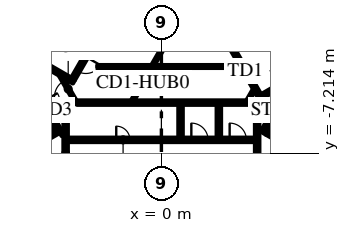
"""IFC4 building model, lengths in metres.
Left out: names, types, materials, properties, quantities, classifications, styles, units other than length and angle.
Written with IfcOpenShell. Run it as: python <this file> out.ifc"""

import sys

from ifc_helpers import new_model, si_unit, direction, frame, frame_2d, origin, place, context, subcontext, project, spatial, polyline, rectangle, outline, extrude, element, fill, save


model = new_model("IFC4")
c1 = context("Model", 3, precision=1e-05, world=origin(), true_north=direction((0.0, 1.0)))
c2 = subcontext(c1, "Body", "Model", "MODEL_VIEW")
j1 = project(units=[si_unit("LENGTHUNIT", "METRE"), si_unit("PLANEANGLEUNIT", "RADIAN")], contexts=[c1])
p1 = place(None, origin())
s1 = spatial("IfcSite", under=j1, at=p1, CompositionType="ELEMENT")
p2 = place(p1, origin())
s2 = spatial("IfcBuilding", under=s1, at=p2, CompositionType="ELEMENT")
p3 = place(p2, frame((0.0, 0.0, 21.6)))
s3 = spatial("IfcBuildingStorey", under=s2, at=p3, CompositionType="ELEMENT", Elevation=21.6)
p4 = place(p3, frame((6.776, 13.364, 0.0), z_axis=(0.0, 0.0, 1.0), x_axis=(0.500004177138, -0.8660229921, 0.0)))
e1 = element("IfcWall", 1, at=p4, inside=s3, PredefinedType="SOLIDWALL", context=c2, shape_type="SweptSolid", body=[
    extrude(rectangle(XDim=20.204, YDim=0.9, at=frame_2d((10.102, 0.0))), origin(), (0.0, 0.0, 1.0), 6.0),
])
p5 = place(p3, frame((-15.36, -1.503, 0.0), z_axis=(0.0, 0.0, 1.0), x_axis=(0.50000389221, 0.866023156604, 0.0)))
e2 = element("IfcWall", 2, at=p5, inside=s3, PredefinedType="SOLIDWALL", context=c2, shape_type="SweptSolid", body=[
    extrude(rectangle(XDim=21.0, YDim=0.9, at=frame_2d((10.5, 0.0))), origin(), (0.0, 0.0, 1.0), 6.0),
])
p6 = place(p3, frame((12.84, -9.261, 0.0), z_axis=(0.0, 0.0, 1.0), x_axis=(-0.866013990052, 0.500019768644, 0.0)))
e3 = element("IfcWall", 3, at=p6, inside=s3, PredefinedType="SOLIDWALL", context=c2, shape_type="SweptSolid", body=[
    extrude(rectangle(XDim=6.8, YDim=0.25, at=frame_2d((3.4, 0.0))), origin(), (0.0, 0.0, 1.0), 6.0),
])
p7 = place(p3, frame((6.78, -5.906, 0.0), z_axis=(0.0, 0.0, 1.0), x_axis=(0.500223362819, 0.865896406789, 0.0)))
e4 = element("IfcWall", 4, at=p7, inside=s3, PredefinedType="SOLIDWALL", context=c2, shape_type="SweptSolid", body=[
    extrude(rectangle(XDim=0.675, YDim=0.25, at=frame_2d((0.337, 0.0))), origin(), (0.0, 0.0, 1.0), 6.0),
])
p8 = place(p3, frame((-12.84, -9.261, 0.0), z_axis=(0.0, 0.0, 1.0), x_axis=(0.866016039709, 0.500016218704, 0.0)))
e5 = element("IfcWall", 5, at=p8, inside=s3, PredefinedType="SOLIDWALL", context=c2, shape_type="SweptSolid", body=[
    extrude(rectangle(XDim=7.05, YDim=0.25, at=frame_2d((3.525, 0.0))), origin(), (0.0, 0.0, 1.0), 6.0),
])
p9 = place(p3, frame((-6.905, -5.69, 0.0), z_axis=(0.0, 0.0, 1.0), x_axis=(-0.500402024738, 0.865793170242, 0.0)))
e6 = element("IfcWall", 6, at=p9, inside=s3, PredefinedType="SOLIDWALL", context=c2, shape_type="SweptSolid", body=[
    extrude(rectangle(XDim=0.425, YDim=0.25, at=frame_2d((0.212, 0.0))), origin(), (0.0, 0.0, 1.0), 6.0),
])
p10 = place(p3, frame((-5.545, -3.875, 0.0), z_axis=(0.0, 0.0, 1.0), x_axis=(1.0, 0.0, 0.0)))
e7 = element("IfcWall", 7, at=p10, inside=s3, PredefinedType="SOLIDWALL", context=c2, shape_type="SweptSolid", body=[
    extrude(rectangle(XDim=11.97, YDim=0.25, at=frame_2d((5.985, 0.0))), origin(), (0.0, 0.0, 1.0), 6.0),
])
p11 = place(p3, frame((-6.425, -3.875, 0.0), z_axis=(0.0, 0.0, 1.0), x_axis=(1.0, 0.0, 0.0)))
e8 = element("IfcWall", 8, at=p11, inside=s3, PredefinedType="SOLIDWALL", context=c2, shape_type="SweptSolid", body=[
    extrude(rectangle(XDim=0.658, YDim=0.25, at=frame_2d((0.329, 0.0))), origin(), (0.0, 0.0, 1.0), 6.0),
])
p12 = place(p3, frame((6.3, -7.268, 0.0), z_axis=(0.0, 0.0, 1.0), x_axis=(0.0, 1.0, 0.0)))
e9 = element("IfcWall", 9, at=p12, inside=s3, PredefinedType="SOLIDWALL", context=c2, shape_type="SweptSolid", body=[
    extrude(rectangle(XDim=3.268, YDim=0.25, at=frame_2d((1.634, 0.0))), origin(), (0.0, 0.0, 1.0), 6.0),
])
for number, where, z_axis, x_axis in (
    (10, (3.78, -4.0, 0.0), (0.0, 0.0, 1.0), (0.0, -1.0, 0.0)),
    (11, (1.26, -4.0, 0.0), (0.0, 0.0, 1.0), (0.0, -1.0, 0.0)),
):
    element("IfcWall", number, at=place(p3, frame(where, z_axis=z_axis, x_axis=x_axis)), inside=s3, PredefinedType="SOLIDWALL", context=c2, shape_type="SweptSolid", body=[
        extrude(rectangle(XDim=2.2, YDim=0.25, at=frame_2d((1.1, 0.0))), origin(), (0.0, 0.0, 1.0), 6.0),
    ])
p13 = place(p3, frame((-6.3, -4.0, 0.0), z_axis=(0.0, 0.0, 1.0), x_axis=(0.0, -1.0, 0.0)))
e12 = element("IfcWall", 12, at=p13, inside=s3, PredefinedType="SOLIDWALL", context=c2, shape_type="SweptSolid", body=[
    extrude(rectangle(XDim=3.154, YDim=0.25, at=frame_2d((1.577, 0.0))), origin(), (0.0, 0.0, 1.0), 6.0),
])
p14 = place(p3, origin())
e13 = element("IfcWall", 13, at=p14, inside=s3, PredefinedType="SOLIDWALL", context=c2, shape_type="SweptSolid", body=[
    extrude(outline(polyline([(0.566, 6.725), (0.566, 6.875), (0.566, 6.875), (0.565, 6.875), (0.361, 6.875), (0.035, 7.439), (0.252, 7.564), (0.377, 7.348), (6.552, -3.348), (6.677, -3.564), (6.46, -3.689), (0.448, 6.725), (0.565, 6.725), (0.566, 6.725), (0.566, 6.725)])), origin(), (0.0, 0.0, 1.0), 6.0),
])
p15 = place(p3, frame((6.614, -3.456, 0.0), z_axis=(0.0, 0.0, 1.0), x_axis=(0.866031582473, 0.499989298045, 0.0)))
e14 = element("IfcWall", 14, at=p15, inside=s3, PredefinedType="SOLIDWALL", context=c2, shape_type="SweptSolid", body=[
    extrude(rectangle(XDim=2.455, YDim=0.25, at=frame_2d((1.228, 0.0))), origin(), (0.0, 0.0, 1.0), 6.0),
])
p16 = place(p3, frame((-8.06, -1.311, 0.0), z_axis=(0.0, 0.0, 1.0), x_axis=(0.50000273126, 0.866023826885, 0.0)))
e15 = element("IfcWall", 15, at=p16, inside=s3, PredefinedType="SOLIDWALL", context=c2, shape_type="SweptSolid", body=[
    extrude(rectangle(XDim=10.33, YDim=0.25, at=frame_2d((5.165, 0.0))), origin(), (0.0, 0.0, 1.0), 6.0),
])
e16 = element("IfcWall", 16, at=p14, inside=s3, PredefinedType="SOLIDWALL", context=c2, shape_type="SweptSolid", body=[
    extrude(outline(polyline([(-5.922, -2.257), (-5.922, -2.257), (-5.705, -2.382), (-5.83, -2.598), (-6.483, -2.221), (-6.591, -2.033), (-6.591, -2.033), (-6.7, -2.096), (-7.952, -1.373), (-7.827, -1.156), (-5.922, -2.257)])), origin(), (0.0, 0.0, 1.0), 6.0),
])
p17 = place(p3, frame((-6.48, -6.027, 0.0), z_axis=(0.0, 0.0, 1.0), x_axis=(-0.499927229454, 0.866067413802, 0.0)))
e17 = element("IfcWall", 17, at=p17, inside=s3, PredefinedType="PARTITIONING", context=c2, shape_type="SweptSolid", body=[
    extrude(rectangle(XDim=0.929, YDim=0.15, at=frame_2d((0.464, 0.0))), origin(), (0.0, 0.0, 1.0), 6.0),
])
p18 = place(p3, frame((-1.887, -3.718, 0.0), z_axis=(0.0, 0.0, 1.0), x_axis=(0.500165633897, 0.865929753888, 0.0)))
e18 = element("IfcWall", 18, at=p18, inside=s3, PredefinedType="PARTITIONING", context=c2, shape_type="SweptSolid", body=[
    extrude(rectangle(XDim=0.254, YDim=0.15, at=frame_2d((0.127, 0.0))), origin(), (0.0, 0.0, 1.0), 4.85),
])
p19 = place(p3, frame((6.945, -5.222, 0.0), z_axis=(0.0, 0.0, 1.0), x_axis=(-0.499818422106, -0.866130212453, 0.0)))
e19 = element("IfcWall", 19, at=p19, inside=s3, PredefinedType="PARTITIONING", context=c2, shape_type="SweptSolid", body=[
    extrude(rectangle(XDim=0.514, YDim=0.15, at=frame_2d((0.257, 0.0))), origin(), (0.0, 0.0, 1.0), 4.85),
])
p20 = place(p3, frame((5.705, -3.718, 0.0), z_axis=(0.0, 0.0, 1.0), x_axis=(0.499962090823, 0.866047289552, 0.0)))
e20 = element("IfcWall", 20, at=p20, inside=s3, PredefinedType="PARTITIONING", context=c2, shape_type="SweptSolid", body=[
    extrude(rectangle(XDim=0.735, YDim=0.15, at=frame_2d((0.367, 0.0))), origin(), (0.0, 0.0, 1.0), 4.85),
])
p21 = place(p3, frame((-4.2, -1.5, 0.0), z_axis=(0.0, 0.0, 1.0), x_axis=(1.0, 0.0, 0.0)))
e21 = element("IfcWall", 21, at=p21, inside=s3, PredefinedType="PARTITIONING", context=c2, shape_type="SweptSolid", body=[
    extrude(rectangle(XDim=9.359, YDim=0.15, at=frame_2d((4.68, 0.0))), origin(), (0.0, 0.0, 1.0), 4.85),
])
p22 = place(p3, frame((-0.544, -1.393, 0.0), z_axis=(0.0, 0.0, 1.0), x_axis=(0.499928740635, 0.866066541489, 0.0)))
e22 = element("IfcWall", 22, at=p22, inside=s3, PredefinedType="PARTITIONING", context=c2, shape_type="SweptSolid", body=[
    extrude(rectangle(XDim=1.912, YDim=0.15, at=frame_2d((0.956, 0.0))), origin(), (0.0, 0.0, 1.0), 4.85),
])
p23 = place(p3, frame((-6.175, -6.325, 0.0), z_axis=(0.0, 0.0, 1.0), x_axis=(1.0, 0.0, 0.0)))
e23 = element("IfcWall", 23, at=p23, inside=s3, PredefinedType="SOLIDWALL", context=c2, shape_type="SweptSolid", body=[
    extrude(rectangle(XDim=12.35, YDim=0.25, at=frame_2d((6.175, 0.0))), origin(), (0.0, 0.0, 1.0), 6.0),
])
p24 = place(p23, frame((3.205, 0.0, 0.0)))
e24 = element("IfcOpeningElement", 24, at=p24, cuts=e23, PredefinedType="OPENING", context=c2, shape_type="SweptSolid", body=[
    extrude(rectangle(XDim=0.9, YDim=2.1, at=frame_2d((0.45, 1.05))), frame((0.0, 0.135, 0.0), z_axis=(0.0, -1.0, 0.0), x_axis=(1.0, 0.0, 0.0)), (0.0, 0.0, 1.0), 0.27),
])
p25 = place(p23, frame((8.145, 0.0, 0.0)))
e25 = element("IfcOpeningElement", 25, at=p25, cuts=e23, PredefinedType="OPENING", context=c2, shape_type="SweptSolid", body=[
    extrude(rectangle(XDim=1.1, YDim=2.1, at=frame_2d((0.55, 1.05))), frame((0.0, 0.135, 0.0), z_axis=(0.0, -1.0, 0.0), x_axis=(1.0, 0.0, 0.0)), (0.0, 0.0, 1.0), 0.27),
])
p26 = place(p23, frame((10.665, 0.0, 0.0)))
e26 = element("IfcOpeningElement", 26, at=p26, cuts=e23, PredefinedType="OPENING", context=c2, shape_type="SweptSolid", body=[
    extrude(rectangle(XDim=1.1, YDim=2.1, at=frame_2d((0.55, 1.05))), frame((0.0, 0.135, 0.0), z_axis=(0.0, -1.0, 0.0), x_axis=(1.0, 0.0, 0.0)), (0.0, 0.0, 1.0), 0.27),
])
p27 = place(p3, frame((8.565, -2.185, 0.0), z_axis=(0.0, 0.0, 1.0), x_axis=(-0.499997954832, 0.866026584559, 0.0)))
e27 = element("IfcWall", 27, at=p27, inside=s3, PredefinedType="SOLIDWALL", context=c2, shape_type="SweptSolid", body=[
    extrude(rectangle(XDim=12.35, YDim=0.25, at=frame_2d((6.175, 0.0))), origin(), (0.0, 0.0, 1.0), 6.0),
])
p28 = place(p27, frame((5.725, 0.0, 0.0)))
e28 = element("IfcOpeningElement", 28, at=p28, cuts=e27, PredefinedType="OPENING", context=c2, shape_type="SweptSolid", body=[
    extrude(rectangle(XDim=0.9, YDim=2.1, at=frame_2d((0.45, 1.05))), frame((0.0, 0.135, 0.0), z_axis=(0.0, -1.0, 0.0), x_axis=(1.0, 0.0, 0.0)), (0.0, 0.0, 1.0), 0.27),
])
p29 = place(p3, frame((-0.898, 6.194, 0.0), z_axis=(0.0, 0.0, 1.0), x_axis=(-0.499996202215, -0.866027596426, 0.0)))
e29 = element("IfcWall", 29, at=p29, inside=s3, PredefinedType="SOLIDWALL", context=c2, shape_type="SweptSolid", body=[
    extrude(rectangle(XDim=9.83, YDim=0.25, at=frame_2d((4.915, 0.0))), origin(), (0.0, 0.0, 1.0), 6.0),
])
p30 = place(p29, frame((0.585, 0.0, 0.0)))
e30 = element("IfcOpeningElement", 30, at=p30, cuts=e29, PredefinedType="OPENING", context=c2, shape_type="SweptSolid", body=[
    extrude(rectangle(XDim=1.1, YDim=2.1, at=frame_2d((0.55, 1.05))), frame((0.0, 0.135, 0.0), z_axis=(0.0, -1.0, 0.0), x_axis=(1.0, 0.0, 0.0)), (0.0, 0.0, 1.0), 0.27),
])
p31 = place(p29, frame((3.105, 0.0, 0.0)))
e31 = element("IfcOpeningElement", 31, at=p31, cuts=e29, PredefinedType="OPENING", context=c2, shape_type="SweptSolid", body=[
    extrude(rectangle(XDim=1.1, YDim=2.1, at=frame_2d((0.55, 1.05))), frame((0.0, 0.135, 0.0), z_axis=(0.0, -1.0, 0.0), x_axis=(1.0, 0.0, 0.0)), (0.0, 0.0, 1.0), 0.27),
])
p32 = place(p29, frame((5.625, 0.0, 0.0)))
e32 = element("IfcOpeningElement", 32, at=p32, cuts=e29, PredefinedType="OPENING", context=c2, shape_type="SweptSolid", body=[
    extrude(rectangle(XDim=1.1, YDim=2.1, at=frame_2d((0.55, 1.05))), frame((0.0, 0.135, 0.0), z_axis=(0.0, -1.0, 0.0), x_axis=(1.0, 0.0, 0.0)), (0.0, 0.0, 1.0), 0.27),
])
p33 = place(p29, frame((8.145, 0.0, 0.0)))
e33 = element("IfcOpeningElement", 33, at=p33, cuts=e29, PredefinedType="OPENING", context=c2, shape_type="SweptSolid", body=[
    extrude(rectangle(XDim=1.1, YDim=2.1, at=frame_2d((0.55, 1.05))), frame((0.0, 0.135, 0.0), z_axis=(0.0, -1.0, 0.0), x_axis=(1.0, 0.0, 0.0)), (0.0, 0.0, 1.0), 0.27),
])
p34 = place(p3, frame((7.053, -5.284, 0.0), z_axis=(0.0, 0.0, 1.0), x_axis=(0.500078061341, 0.865980330357, 0.0)))
e34 = element("IfcWall", 34, at=p34, inside=s3, PredefinedType="SOLIDWALL", context=c2, shape_type="SweptSolid", body=[
    extrude(rectangle(XDim=2.1, YDim=0.4, at=frame_2d((1.05, 0.0))), origin(), (0.0, 0.0, 1.0), 6.0),
])
p35 = place(p34, frame((0.45, 0.0, 0.0)))
e35 = element("IfcOpeningElement", 35, at=p35, cuts=e34, PredefinedType="OPENING", context=c2, shape_type="SweptSolid", body=[
    extrude(rectangle(XDim=1.2, YDim=2.1, at=frame_2d((0.6, 1.05))), frame((0.0, 0.21, 0.0), z_axis=(0.0, -1.0, 0.0), x_axis=(1.0, 0.0, 0.0)), (0.0, 0.0, 1.0), 0.42),
])
p36 = place(p3, frame((-8.103, -3.466, 0.0), z_axis=(0.0, 0.0, 1.0), x_axis=(0.500078061341, -0.865980330357, 0.0)))
e36 = element("IfcWall", 36, at=p36, inside=s3, PredefinedType="SOLIDWALL", context=c2, shape_type="SweptSolid", body=[
    extrude(rectangle(XDim=2.1, YDim=0.4, at=frame_2d((1.05, 0.0))), origin(), (0.0, 0.0, 1.0), 6.0),
])
p37 = place(p36, frame((0.45, 0.0, 0.0)))
e37 = element("IfcOpeningElement", 37, at=p37, cuts=e36, PredefinedType="OPENING", context=c2, shape_type="SweptSolid", body=[
    extrude(rectangle(XDim=1.2, YDim=2.1, at=frame_2d((0.6, 1.05))), frame((0.0, 0.21, 0.0), z_axis=(0.0, -1.0, 0.0), x_axis=(1.0, 0.0, 0.0)), (0.0, 0.0, 1.0), 0.42),
])
p38 = place(p3, frame((-6.3, -7.154, 0.0), z_axis=(0.0, 0.0, 1.0), x_axis=(0.0, -1.0, 0.0)))
e38 = element("IfcWall", 38, at=p38, inside=s3, PredefinedType="SOLIDWALL", context=c2, shape_type="SweptSolid", body=[
    extrude(rectangle(XDim=1.8, YDim=0.25, at=frame_2d((0.9, 0.0))), origin(), (0.0, 0.0, 1.0), 6.0),
])
p39 = place(p38, frame((0.45, 0.0, 0.0)))
e39 = element("IfcOpeningElement", 39, at=p39, cuts=e38, PredefinedType="OPENING", context=c2, shape_type="SweptSolid", body=[
    extrude(rectangle(XDim=0.9, YDim=2.1, at=frame_2d((0.45, 1.05))), frame((0.0, 0.135, 0.0), z_axis=(0.0, -1.0, 0.0), x_axis=(1.0, 0.0, 0.0)), (0.0, 0.0, 1.0), 0.27),
])
p40 = place(p3, frame((-1.76, -3.498, 0.0), z_axis=(0.0, 0.0, 1.0), x_axis=(0.499977374825, 0.866038466041, 0.0)))
e40 = element("IfcWall", 40, at=p40, inside=s3, PredefinedType="PARTITIONING", context=c2, shape_type="SweptSolid", body=[
    extrude(rectangle(XDim=2.1, YDim=0.15, at=frame_2d((1.05, 0.0))), origin(), (0.0, 0.0, 1.0), 4.85),
])
p41 = place(p40, frame((0.6, 0.0, 0.0)))
e41 = element("IfcOpeningElement", 41, at=p41, cuts=e40, PredefinedType="OPENING", context=c2, shape_type="SweptSolid", body=[
    extrude(rectangle(XDim=0.9, YDim=2.1, at=frame_2d((0.45, 1.05))), frame((0.0, 0.085, 0.0), z_axis=(0.0, -1.0, 0.0), x_axis=(1.0, 0.0, 0.0)), (0.0, 0.0, 1.0), 0.17),
])
p42 = place(p3, frame((-5.606, -3.89, 0.0), z_axis=(0.0, 0.0, 1.0), x_axis=(-0.500027713859, 0.866009402589, 0.0)))
e42 = element("IfcWall", 42, at=p42, inside=s3, PredefinedType="PARTITIONING", context=c2, shape_type="SweptSolid", body=[
    extrude(rectangle(XDim=2.1, YDim=0.15, at=frame_2d((1.05, 0.0))), origin(), (0.0, 0.0, 1.0), 4.85),
])
p43 = place(p42, frame((0.45, 0.0, 0.0)))
e43 = element("IfcOpeningElement", 43, at=p43, cuts=e42, PredefinedType="OPENING", context=c2, shape_type="SweptSolid", body=[
    extrude(rectangle(XDim=1.2, YDim=2.1, at=frame_2d((0.6, 1.05))), frame((0.0, 0.085, 0.0), z_axis=(0.0, -1.0, 0.0), x_axis=(1.0, 0.0, 0.0)), (0.0, 0.0, 1.0), 0.17),
])
for number, where, z_axis, x_axis in (
    (44, (38.25, -14.145, 0.0), (0.0, 0.0, 1.0), (-0.5, 0.866, 0.0)),
    (45, (-6.875, 40.198, 0.0), (0.0, 0.0, 1.0), (-0.5, -0.866, 0.0)),
):
    element("IfcWall", number, at=place(p3, frame(where, z_axis=z_axis, x_axis=x_axis)), inside=s3, PredefinedType="SOLIDWALL", context=c2, shape_type="SweptSolid", body=[
        extrude(rectangle(XDim=62.75, YDim=0.25, at=frame_2d((31.375, 0.0))), origin(), (0.0, 0.0, 1.0), 4.5),
    ])
p44 = place(p24, origin())
e46 = element("IfcDoor", 46, at=p44, inside=s3, OperationType="SINGLE_SWING_LEFT", PredefinedType="DOOR", context=c2, shape_type="SweptSolid", body=[
    extrude(rectangle(XDim=0.9, YDim=2.1, at=frame_2d((0.45, 1.05))), frame((0.0, 0.025, 0.0), z_axis=(0.0, -1.0, 0.0), x_axis=(1.0, 0.0, 0.0)), (0.0, 0.0, 1.0), 0.05),
])
fill(e24, e46)
p45 = place(p25, origin())
e47 = element("IfcDoor", 47, at=p45, inside=s3, OperationType="DOUBLE_DOOR_SLIDING", PredefinedType="DOOR", context=c2, shape_type="SweptSolid", body=[
    extrude(rectangle(XDim=1.1, YDim=2.1, at=frame_2d((0.55, 1.05))), frame((0.0, 0.025, 0.0), z_axis=(0.0, -1.0, 0.0), x_axis=(1.0, 0.0, 0.0)), (0.0, 0.0, 1.0), 0.05),
])
fill(e25, e47)
p46 = place(p26, origin())
e48 = element("IfcDoor", 48, at=p46, inside=s3, OperationType="DOUBLE_DOOR_SLIDING", PredefinedType="DOOR", context=c2, shape_type="SweptSolid", body=[
    extrude(rectangle(XDim=1.1, YDim=2.1, at=frame_2d((0.55, 1.05))), frame((0.0, 0.025, 0.0), z_axis=(0.0, -1.0, 0.0), x_axis=(1.0, 0.0, 0.0)), (0.0, 0.0, 1.0), 0.05),
])
fill(e26, e48)
p47 = place(p33, origin())
e49 = element("IfcDoor", 49, at=p47, inside=s3, OperationType="DOUBLE_DOOR_SLIDING", PredefinedType="DOOR", context=c2, shape_type="SweptSolid", body=[
    extrude(rectangle(XDim=1.1, YDim=2.1, at=frame_2d((0.55, 1.05))), frame((0.0, 0.025, 0.0), z_axis=(0.0, -1.0, 0.0), x_axis=(1.0, 0.0, 0.0)), (0.0, 0.0, 1.0), 0.05),
])
fill(e33, e49)
p48 = place(p41, origin())
e50 = element("IfcDoor", 50, at=p48, inside=s3, OperationType="SINGLE_SWING_LEFT", PredefinedType="DOOR", context=c2, shape_type="SweptSolid", body=[
    extrude(rectangle(XDim=0.9, YDim=2.1, at=frame_2d((0.45, 1.05))), frame((0.0, 0.025, 0.0), z_axis=(0.0, -1.0, 0.0), x_axis=(1.0, 0.0, 0.0)), (0.0, 0.0, 1.0), 0.05),
])
fill(e41, e50)
p49 = place(p43, origin())
e51 = element("IfcDoor", 51, at=p49, inside=s3, OperationType="SINGLE_SWING_LEFT", PredefinedType="DOOR", context=c2, shape_type="SweptSolid", body=[
    extrude(rectangle(XDim=1.2, YDim=2.1, at=frame_2d((0.6, 1.05))), frame((0.0, 0.025, 0.0), z_axis=(0.0, -1.0, 0.0), x_axis=(1.0, 0.0, 0.0)), (0.0, 0.0, 1.0), 0.05),
])
fill(e43, e51)
save(model, sys.argv[1])
